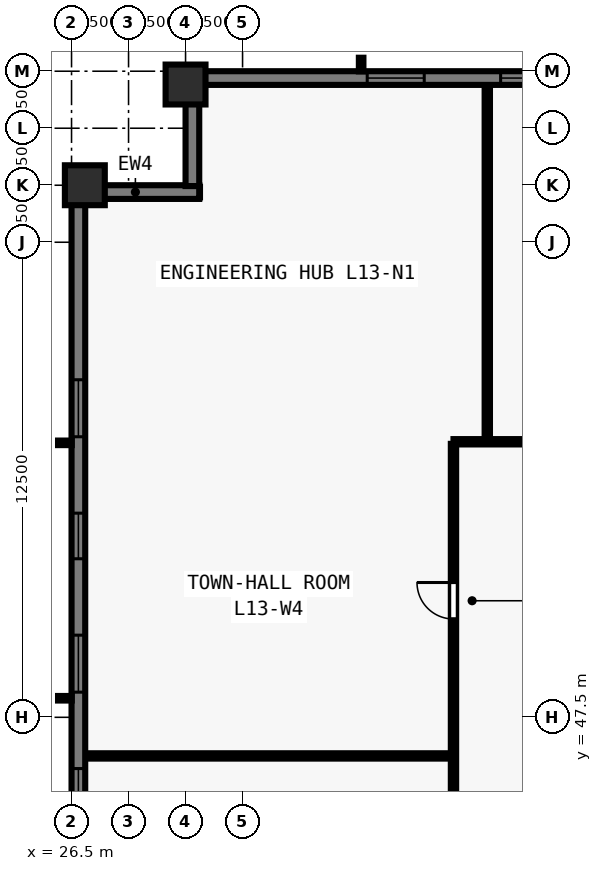
"""IFC4 building model, lengths in metres.
Left out: names, types, materials, properties, quantities, classifications, styles, units other than length and angle.
Written with IfcOpenShell. Run it as: python <this file> out.ifc"""

import sys

from ifc_helpers import new_model, si_unit, direction, frame, frame_2d, origin, origin_2d, place, context, subcontext, project, spatial, rectangle, extrude, element, fill, save


model = new_model("IFC4")
c1 = context("Model", 3, precision=1e-05, world=origin(), true_north=direction((0.0, 1.0)))
c2 = subcontext(c1, "Body", "Model", "MODEL_VIEW")
j1 = project(units=[si_unit("LENGTHUNIT", "METRE"), si_unit("PLANEANGLEUNIT", "RADIAN")], contexts=[c1])
p1 = place(None, origin())
s1 = spatial("IfcSite", under=j1, at=p1, CompositionType="ELEMENT")
p2 = place(p1, origin())
s2 = spatial("IfcBuilding", under=s1, at=p2, CompositionType="ELEMENT")
p3 = place(p2, frame((0.0, 0.0, 51.5)))
s3 = spatial("IfcBuildingStorey", under=s2, at=p3, CompositionType="ELEMENT", Elevation=51.5)
for number, where, z_axis, x_axis in (
    (1, (29.5, 64.15, 0.0), (0.0, 0.0, 1.0), (1.0, 0.0, 0.0)),
    (2, (26.85, 61.5, 0.0), (0.0, 0.0, 1.0), (0.0, 1.0, 0.0)),
):
    element("IfcColumn", number, at=place(p3, frame(where, z_axis=z_axis, x_axis=x_axis)), inside=s3, PredefinedType="COLUMN", context=c2, shape_type="SweptSolid", body=[
        extrude(rectangle(XDim=1.05, YDim=1.05, at=origin_2d()), origin(), (0.0, 0.0, 1.0), 3.5),
    ])
p4 = place(p3, frame((26.68, 16.5, 0.0), z_axis=(0.0, 0.0, 1.0), x_axis=(0.0, 1.0, 0.0)))
e3 = element("IfcWall", 3, at=p4, inside=s3, PredefinedType="SOLIDWALL", context=c2, shape_type="SweptSolid", body=[
    extrude(rectangle(XDim=44.662, YDim=0.36, at=frame_2d((22.331, 0.0))), origin(), (0.0, 0.0, 1.0), 3.28),
])
p5 = place(p4, frame((4.78, 0.0, 0.8)))
e4 = element("IfcOpeningElement", 4, at=p5, cuts=e3, PredefinedType="OPENING", context=c2, shape_type="SweptSolid", body=[
    extrude(rectangle(XDim=1.5, YDim=1.544, at=frame_2d((0.75, 0.772))), frame((0.0, 0.19, 0.0), z_axis=(0.0, -1.0, 0.0), x_axis=(1.0, 0.0, 0.0)), (0.0, 0.0, 1.0), 0.38),
])
p6 = place(p4, frame((8.29, 0.0, 0.8)))
e5 = element("IfcOpeningElement", 5, at=p6, cuts=e3, PredefinedType="OPENING", context=c2, shape_type="SweptSolid", body=[
    extrude(rectangle(XDim=1.2, YDim=1.544, at=frame_2d((0.6, 0.772))), frame((0.0, 0.19, 0.0), z_axis=(0.0, -1.0, 0.0), x_axis=(1.0, 0.0, 0.0)), (0.0, 0.0, 1.0), 0.38),
])
p7 = place(p4, frame((11.5, 0.0, 0.8)))
e6 = element("IfcOpeningElement", 6, at=p7, cuts=e3, PredefinedType="OPENING", context=c2, shape_type="SweptSolid", body=[
    extrude(rectangle(XDim=1.5, YDim=1.544, at=frame_2d((0.75, 0.772))), frame((0.0, 0.19, 0.0), z_axis=(0.0, -1.0, 0.0), x_axis=(1.0, 0.0, 0.0)), (0.0, 0.0, 1.0), 0.38),
])
p8 = place(p4, frame((15.01, 0.0, 0.8)))
e7 = element("IfcOpeningElement", 7, at=p8, cuts=e3, PredefinedType="OPENING", context=c2, shape_type="SweptSolid", body=[
    extrude(rectangle(XDim=1.2, YDim=1.544, at=frame_2d((0.6, 0.772))), frame((0.0, 0.19, 0.0), z_axis=(0.0, -1.0, 0.0), x_axis=(1.0, 0.0, 0.0)), (0.0, 0.0, 1.0), 0.38),
])
p9 = place(p4, frame((18.671, 0.0, 0.8)))
e8 = element("IfcOpeningElement", 8, at=p9, cuts=e3, PredefinedType="OPENING", context=c2, shape_type="SweptSolid", body=[
    extrude(rectangle(XDim=1.5, YDim=1.544, at=frame_2d((0.75, 0.772))), frame((0.0, 0.19, 0.0), z_axis=(0.0, -1.0, 0.0), x_axis=(1.0, 0.0, 0.0)), (0.0, 0.0, 1.0), 0.38),
])
p10 = place(p4, frame((20.881, 0.0, 0.8)))
e9 = element("IfcOpeningElement", 9, at=p10, cuts=e3, PredefinedType="OPENING", context=c2, shape_type="SweptSolid", body=[
    extrude(rectangle(XDim=1.2, YDim=1.544, at=frame_2d((0.6, 0.772))), frame((0.0, 0.19, 0.0), z_axis=(0.0, -1.0, 0.0), x_axis=(1.0, 0.0, 0.0)), (0.0, 0.0, 1.0), 0.38),
])
p11 = place(p4, frame((24.941, 0.0, 0.8)))
e10 = element("IfcOpeningElement", 10, at=p11, cuts=e3, PredefinedType="OPENING", context=c2, shape_type="SweptSolid", body=[
    extrude(rectangle(XDim=1.5, YDim=1.544, at=frame_2d((0.75, 0.772))), frame((0.0, 0.19, 0.0), z_axis=(0.0, -1.0, 0.0), x_axis=(1.0, 0.0, 0.0)), (0.0, 0.0, 1.0), 0.38),
])
p12 = place(p4, frame((28.451, 0.0, 0.8)))
e11 = element("IfcOpeningElement", 11, at=p12, cuts=e3, PredefinedType="OPENING", context=c2, shape_type="SweptSolid", body=[
    extrude(rectangle(XDim=1.2, YDim=1.544, at=frame_2d((0.6, 0.772))), frame((0.0, 0.19, 0.0), z_axis=(0.0, -1.0, 0.0), x_axis=(1.0, 0.0, 0.0)), (0.0, 0.0, 1.0), 0.38),
])
p13 = place(p4, frame((31.662, 0.0, 0.8)))
e12 = element("IfcOpeningElement", 12, at=p13, cuts=e3, PredefinedType="OPENING", context=c2, shape_type="SweptSolid", body=[
    extrude(rectangle(XDim=1.5, YDim=1.544, at=frame_2d((0.75, 0.772))), frame((0.0, 0.19, 0.0), z_axis=(0.0, -1.0, 0.0), x_axis=(1.0, 0.0, 0.0)), (0.0, 0.0, 1.0), 0.38),
])
p14 = place(p4, frame((35.172, 0.0, 0.8)))
e13 = element("IfcOpeningElement", 13, at=p14, cuts=e3, PredefinedType="OPENING", context=c2, shape_type="SweptSolid", body=[
    extrude(rectangle(XDim=1.2, YDim=1.544, at=frame_2d((0.6, 0.772))), frame((0.0, 0.19, 0.0), z_axis=(0.0, -1.0, 0.0), x_axis=(1.0, 0.0, 0.0)), (0.0, 0.0, 1.0), 0.38),
])
p15 = place(p4, frame((38.382, 0.0, 0.8)))
e14 = element("IfcOpeningElement", 14, at=p15, cuts=e3, PredefinedType="OPENING", context=c2, shape_type="SweptSolid", body=[
    extrude(rectangle(XDim=1.5, YDim=1.544, at=frame_2d((0.75, 0.772))), frame((0.0, 0.19, 0.0), z_axis=(0.0, -1.0, 0.0), x_axis=(1.0, 0.0, 0.0)), (0.0, 0.0, 1.0), 0.38),
])
p16 = place(p3, frame((26.5, 61.32, 0.0), z_axis=(0.0, 0.0, 1.0), x_axis=(1.0, 0.0, 0.0)))
e15 = element("IfcWall", 15, at=p16, inside=s3, PredefinedType="SOLIDWALL", context=c2, shape_type="SweptSolid", body=[
    extrude(rectangle(XDim=3.36, YDim=0.36, at=frame_2d((1.68, 0.0))), origin(), (0.0, 0.0, 1.0), 3.28),
])
p17 = place(p3, frame((29.68, 61.478, 0.0), z_axis=(0.0, 0.0, 1.0), x_axis=(0.0, 1.0, 0.0)))
e16 = element("IfcWall", 16, at=p17, inside=s3, PredefinedType="SOLIDWALL", context=c2, shape_type="SweptSolid", body=[
    extrude(rectangle(XDim=2.684, YDim=0.36, at=frame_2d((1.342, 0.0))), origin(), (0.0, 0.0, 1.0), 3.28),
])
p18 = place(p3, frame((29.5, 64.32, 0.0), z_axis=(0.0, 0.0, 1.0), x_axis=(1.0, 0.0, 0.0)))
e17 = element("IfcWall", 17, at=p18, inside=s3, PredefinedType="SOLIDWALL", context=c2, shape_type="SweptSolid", body=[
    extrude(rectangle(XDim=44.662, YDim=0.36, at=frame_2d((22.331, 0.0))), origin(), (0.0, 0.0, 1.0), 3.28),
])
p19 = place(p18, frame((4.78, 0.0, 0.8)))
e18 = element("IfcOpeningElement", 18, at=p19, cuts=e17, PredefinedType="OPENING", context=c2, shape_type="SweptSolid", body=[
    extrude(rectangle(XDim=1.5, YDim=1.544, at=frame_2d((0.75, 0.772))), frame((0.0, 0.19, 0.0), z_axis=(0.0, -1.0, 0.0), x_axis=(1.0, 0.0, 0.0)), (0.0, 0.0, 1.0), 0.38),
])
p20 = place(p18, frame((8.29, 0.0, 0.8)))
e19 = element("IfcOpeningElement", 19, at=p20, cuts=e17, PredefinedType="OPENING", context=c2, shape_type="SweptSolid", body=[
    extrude(rectangle(XDim=1.2, YDim=1.544, at=frame_2d((0.6, 0.772))), frame((0.0, 0.19, 0.0), z_axis=(0.0, -1.0, 0.0), x_axis=(1.0, 0.0, 0.0)), (0.0, 0.0, 1.0), 0.38),
])
p21 = place(p18, frame((11.5, 0.0, 0.8)))
e20 = element("IfcOpeningElement", 20, at=p21, cuts=e17, PredefinedType="OPENING", context=c2, shape_type="SweptSolid", body=[
    extrude(rectangle(XDim=1.5, YDim=1.544, at=frame_2d((0.75, 0.772))), frame((0.0, 0.19, 0.0), z_axis=(0.0, -1.0, 0.0), x_axis=(1.0, 0.0, 0.0)), (0.0, 0.0, 1.0), 0.38),
])
p22 = place(p18, frame((15.01, 0.0, 0.8)))
e21 = element("IfcOpeningElement", 21, at=p22, cuts=e17, PredefinedType="OPENING", context=c2, shape_type="SweptSolid", body=[
    extrude(rectangle(XDim=1.2, YDim=1.544, at=frame_2d((0.6, 0.772))), frame((0.0, 0.19, 0.0), z_axis=(0.0, -1.0, 0.0), x_axis=(1.0, 0.0, 0.0)), (0.0, 0.0, 1.0), 0.38),
])
p23 = place(p18, frame((18.671, 0.0, 0.8)))
e22 = element("IfcOpeningElement", 22, at=p23, cuts=e17, PredefinedType="OPENING", context=c2, shape_type="SweptSolid", body=[
    extrude(rectangle(XDim=1.5, YDim=1.544, at=frame_2d((0.75, 0.772))), frame((0.0, 0.19, 0.0), z_axis=(0.0, -1.0, 0.0), x_axis=(1.0, 0.0, 0.0)), (0.0, 0.0, 1.0), 0.38),
])
p24 = place(p18, frame((21.731, 0.0, 0.8)))
e23 = element("IfcOpeningElement", 23, at=p24, cuts=e17, PredefinedType="OPENING", context=c2, shape_type="SweptSolid", body=[
    extrude(rectangle(XDim=1.2, YDim=1.544, at=frame_2d((0.6, 0.772))), frame((0.0, 0.19, 0.0), z_axis=(0.0, -1.0, 0.0), x_axis=(1.0, 0.0, 0.0)), (0.0, 0.0, 1.0), 0.38),
])
p25 = place(p18, frame((24.941, 0.0, 0.8)))
e24 = element("IfcOpeningElement", 24, at=p25, cuts=e17, PredefinedType="OPENING", context=c2, shape_type="SweptSolid", body=[
    extrude(rectangle(XDim=1.5, YDim=1.544, at=frame_2d((0.75, 0.772))), frame((0.0, 0.19, 0.0), z_axis=(0.0, -1.0, 0.0), x_axis=(1.0, 0.0, 0.0)), (0.0, 0.0, 1.0), 0.38),
])
p26 = place(p18, frame((28.451, 0.0, 0.8)))
e25 = element("IfcOpeningElement", 25, at=p26, cuts=e17, PredefinedType="OPENING", context=c2, shape_type="SweptSolid", body=[
    extrude(rectangle(XDim=1.2, YDim=1.544, at=frame_2d((0.6, 0.772))), frame((0.0, 0.19, 0.0), z_axis=(0.0, -1.0, 0.0), x_axis=(1.0, 0.0, 0.0)), (0.0, 0.0, 1.0), 0.38),
])
p27 = place(p18, frame((31.662, 0.0, 0.8)))
e26 = element("IfcOpeningElement", 26, at=p27, cuts=e17, PredefinedType="OPENING", context=c2, shape_type="SweptSolid", body=[
    extrude(rectangle(XDim=1.5, YDim=1.544, at=frame_2d((0.75, 0.772))), frame((0.0, 0.19, 0.0), z_axis=(0.0, -1.0, 0.0), x_axis=(1.0, 0.0, 0.0)), (0.0, 0.0, 1.0), 0.38),
])
p28 = place(p18, frame((35.172, 0.0, 0.8)))
e27 = element("IfcOpeningElement", 27, at=p28, cuts=e17, PredefinedType="OPENING", context=c2, shape_type="SweptSolid", body=[
    extrude(rectangle(XDim=1.2, YDim=1.544, at=frame_2d((0.6, 0.772))), frame((0.0, 0.19, 0.0), z_axis=(0.0, -1.0, 0.0), x_axis=(1.0, 0.0, 0.0)), (0.0, 0.0, 1.0), 0.38),
])
p29 = place(p18, frame((38.382, 0.0, 0.8)))
e28 = element("IfcOpeningElement", 28, at=p29, cuts=e17, PredefinedType="OPENING", context=c2, shape_type="SweptSolid", body=[
    extrude(rectangle(XDim=1.5, YDim=1.544, at=frame_2d((0.75, 0.772))), frame((0.0, 0.19, 0.0), z_axis=(0.0, -1.0, 0.0), x_axis=(1.0, 0.0, 0.0)), (0.0, 0.0, 1.0), 0.38),
])
p30 = place(p3, frame((36.55, 54.75, 0.0), z_axis=(0.0, 0.0, 1.0), x_axis=(1.0, 0.0, 0.0)))
e29 = element("IfcWall", 29, at=p30, inside=s3, PredefinedType="PARTITIONING", context=c2, shape_type="SweptSolid", body=[
    extrude(rectangle(XDim=30.9, YDim=0.14, at=frame_2d((15.45, 0.0))), origin(), (0.0, 0.0, 1.0), 3.28),
])
p31 = place(p30, frame((3.69, 0.0, 0.0)))
e30 = element("IfcOpeningElement", 30, at=p31, cuts=e29, PredefinedType="OPENING", context=c2, shape_type="SweptSolid", body=[
    extrude(rectangle(XDim=0.96, YDim=2.12, at=frame_2d((0.48, 1.06))), frame((0.0, 0.08, 0.0), z_axis=(0.0, -1.0, 0.0), x_axis=(1.0, 0.0, 0.0)), (0.0, 0.0, 1.0), 0.16),
])
p32 = place(p30, frame((5.013, 0.0, 0.0)))
e31 = element("IfcOpeningElement", 31, at=p32, cuts=e29, PredefinedType="OPENING", context=c2, shape_type="SweptSolid", body=[
    extrude(rectangle(XDim=0.96, YDim=2.12, at=frame_2d((0.48, 1.06))), frame((0.0, 0.08, 0.0), z_axis=(0.0, -1.0, 0.0), x_axis=(1.0, 0.0, 0.0)), (0.0, 0.0, 1.0), 0.16),
])
p33 = place(p30, frame((15.045, 0.0, 0.0)))
e32 = element("IfcOpeningElement", 32, at=p33, cuts=e29, PredefinedType="OPENING", context=c2, shape_type="SweptSolid", body=[
    extrude(rectangle(XDim=0.96, YDim=2.12, at=frame_2d((0.48, 1.06))), frame((0.0, 0.08, 0.0), z_axis=(0.0, -1.0, 0.0), x_axis=(1.0, 0.0, 0.0)), (0.0, 0.0, 1.0), 0.16),
])
p34 = place(p30, frame((25.077, 0.0, 0.0)))
e33 = element("IfcOpeningElement", 33, at=p34, cuts=e29, PredefinedType="OPENING", context=c2, shape_type="SweptSolid", body=[
    extrude(rectangle(XDim=0.96, YDim=2.12, at=frame_2d((0.48, 1.06))), frame((0.0, 0.08, 0.0), z_axis=(0.0, -1.0, 0.0), x_axis=(1.0, 0.0, 0.0)), (0.0, 0.0, 1.0), 0.16),
])
p35 = place(p30, frame((28.92, 0.0, 0.0)))
e34 = element("IfcOpeningElement", 34, at=p35, cuts=e29, PredefinedType="OPENING", context=c2, shape_type="SweptSolid", body=[
    extrude(rectangle(XDim=0.96, YDim=2.12, at=frame_2d((0.48, 1.06))), frame((0.0, 0.08, 0.0), z_axis=(0.0, -1.0, 0.0), x_axis=(1.0, 0.0, 0.0)), (0.0, 0.0, 1.0), 0.16),
])
p36 = place(p3, frame((36.55, 23.305, 0.0), z_axis=(0.0, 0.0, 1.0), x_axis=(0.0, 1.0, 0.0)))
e35 = element("IfcWall", 35, at=p36, inside=s3, PredefinedType="PARTITIONING", context=c2, shape_type="SweptSolid", body=[
    extrude(rectangle(XDim=31.39, YDim=0.14, at=frame_2d((15.695, 0.0))), origin(), (0.0, 0.0, 1.0), 3.28),
])
p37 = place(p36, frame((3.307, 0.0, 0.0)))
e36 = element("IfcOpeningElement", 36, at=p37, cuts=e35, PredefinedType="OPENING", context=c2, shape_type="SweptSolid", body=[
    extrude(rectangle(XDim=0.96, YDim=2.12, at=frame_2d((0.48, 1.06))), frame((0.0, 0.08, 0.0), z_axis=(0.0, -1.0, 0.0), x_axis=(1.0, 0.0, 0.0)), (0.0, 0.0, 1.0), 0.16),
])
p38 = place(p36, frame((11.25, 0.0, 0.0)))
e37 = element("IfcOpeningElement", 37, at=p38, cuts=e35, PredefinedType="OPENING", context=c2, shape_type="SweptSolid", body=[
    extrude(rectangle(XDim=0.96, YDim=2.12, at=frame_2d((0.48, 1.06))), frame((0.0, 0.08, 0.0), z_axis=(0.0, -1.0, 0.0), x_axis=(1.0, 0.0, 0.0)), (0.0, 0.0, 1.0), 0.16),
])
p39 = place(p36, frame((19.075, 0.0, 0.0)))
e38 = element("IfcOpeningElement", 38, at=p39, cuts=e35, PredefinedType="OPENING", context=c2, shape_type="SweptSolid", body=[
    extrude(rectangle(XDim=0.96, YDim=2.12, at=frame_2d((0.48, 1.06))), frame((0.0, 0.08, 0.0), z_axis=(0.0, -1.0, 0.0), x_axis=(1.0, 0.0, 0.0)), (0.0, 0.0, 1.0), 0.16),
])
p40 = place(p36, frame((26.782, 0.0, 0.0)))
e39 = element("IfcOpeningElement", 39, at=p40, cuts=e35, PredefinedType="OPENING", context=c2, shape_type="SweptSolid", body=[
    extrude(rectangle(XDim=0.96, YDim=2.12, at=frame_2d((0.48, 1.06))), frame((0.0, 0.08, 0.0), z_axis=(0.0, -1.0, 0.0), x_axis=(1.0, 0.0, 0.0)), (0.0, 0.0, 1.0), 0.16),
])
p41 = place(p3, frame((37.439, 54.85, 0.0), z_axis=(0.0, 0.0, 1.0), x_axis=(0.0, 1.0, 0.0)))
e40 = element("IfcWall", 40, at=p41, inside=s3, PredefinedType="PARTITIONING", context=c2, shape_type="SweptSolid", body=[
    extrude(rectangle(XDim=9.23, YDim=0.14, at=frame_2d((4.615, 0.0))), origin(), (0.0, 0.0, 1.0), 3.28),
])
p42 = place(p3, frame((26.92, 46.484, 0.0), z_axis=(0.0, 0.0, 1.0), x_axis=(1.0, 0.0, 0.0)))
e41 = element("IfcWall", 41, at=p42, inside=s3, PredefinedType="PARTITIONING", context=c2, shape_type="SweptSolid", body=[
    extrude(rectangle(XDim=9.53, YDim=0.14, at=frame_2d((4.765, 0.0))), origin(), (0.0, 0.0, 1.0), 3.28),
])
p43 = place(p12, origin())
e42 = element("IfcWindow", 42, at=p43, inside=s3, PartitioningType="SINGLE_PANEL", PredefinedType="WINDOW", context=c2, shape_type="SweptSolid", body=[
    extrude(rectangle(XDim=1.2, YDim=1.544, at=frame_2d((0.6, 0.772))), frame((0.0, -0.05, 0.0), z_axis=(0.0, -1.0, 0.0), x_axis=(1.0, 0.0, 0.0)), (0.0, 0.0, 1.0), 0.06),
])
fill(e11, e42)
p44 = place(p13, origin())
e43 = element("IfcWindow", 43, at=p44, inside=s3, PartitioningType="SINGLE_PANEL", PredefinedType="WINDOW", context=c2, shape_type="SweptSolid", body=[
    extrude(rectangle(XDim=1.5, YDim=1.544, at=frame_2d((0.75, 0.772))), frame((0.0, -0.05, 0.0), z_axis=(0.0, -1.0, 0.0), x_axis=(1.0, 0.0, 0.0)), (0.0, 0.0, 1.0), 0.06),
])
fill(e12, e43)
p45 = place(p14, origin())
e44 = element("IfcWindow", 44, at=p45, inside=s3, PartitioningType="SINGLE_PANEL", PredefinedType="WINDOW", context=c2, shape_type="SweptSolid", body=[
    extrude(rectangle(XDim=1.2, YDim=1.544, at=frame_2d((0.6, 0.772))), frame((0.0, -0.05, 0.0), z_axis=(0.0, -1.0, 0.0), x_axis=(1.0, 0.0, 0.0)), (0.0, 0.0, 1.0), 0.06),
])
fill(e13, e44)
p46 = place(p15, origin())
e45 = element("IfcWindow", 45, at=p46, inside=s3, PartitioningType="SINGLE_PANEL", PredefinedType="WINDOW", context=c2, shape_type="SweptSolid", body=[
    extrude(rectangle(XDim=1.5, YDim=1.544, at=frame_2d((0.75, 0.772))), frame((0.0, -0.05, 0.0), z_axis=(0.0, -1.0, 0.0), x_axis=(1.0, 0.0, 0.0)), (0.0, 0.0, 1.0), 0.06),
])
fill(e14, e45)
p47 = place(p19, origin())
e46 = element("IfcWindow", 46, at=p47, inside=s3, PartitioningType="SINGLE_PANEL", PredefinedType="WINDOW", context=c2, shape_type="SweptSolid", body=[
    extrude(rectangle(XDim=1.5, YDim=1.544, at=frame_2d((0.75, 0.772))), frame((0.0, -0.05, 0.0), z_axis=(0.0, -1.0, 0.0), x_axis=(1.0, 0.0, 0.0)), (0.0, 0.0, 1.0), 0.06),
])
fill(e18, e46)
p48 = place(p20, origin())
e47 = element("IfcWindow", 47, at=p48, inside=s3, PartitioningType="SINGLE_PANEL", PredefinedType="WINDOW", context=c2, shape_type="SweptSolid", body=[
    extrude(rectangle(XDim=1.2, YDim=1.544, at=frame_2d((0.6, 0.772))), frame((0.0, -0.05, 0.0), z_axis=(0.0, -1.0, 0.0), x_axis=(1.0, 0.0, 0.0)), (0.0, 0.0, 1.0), 0.06),
])
fill(e19, e47)
p49 = place(p40, origin())
e48 = element("IfcDoor", 48, at=p49, inside=s3, OperationType="SINGLE_SWING_RIGHT", PredefinedType="DOOR", context=c2, shape_type="SweptSolid", body=[
    extrude(rectangle(XDim=0.96, YDim=2.12, at=frame_2d((0.48, 1.06))), frame((0.0, 0.025, 0.0), z_axis=(0.0, -1.0, 0.0), x_axis=(1.0, 0.0, 0.0)), (0.0, 0.0, 1.0), 0.05),
])
fill(e39, e48)
save(model, sys.argv[1])
